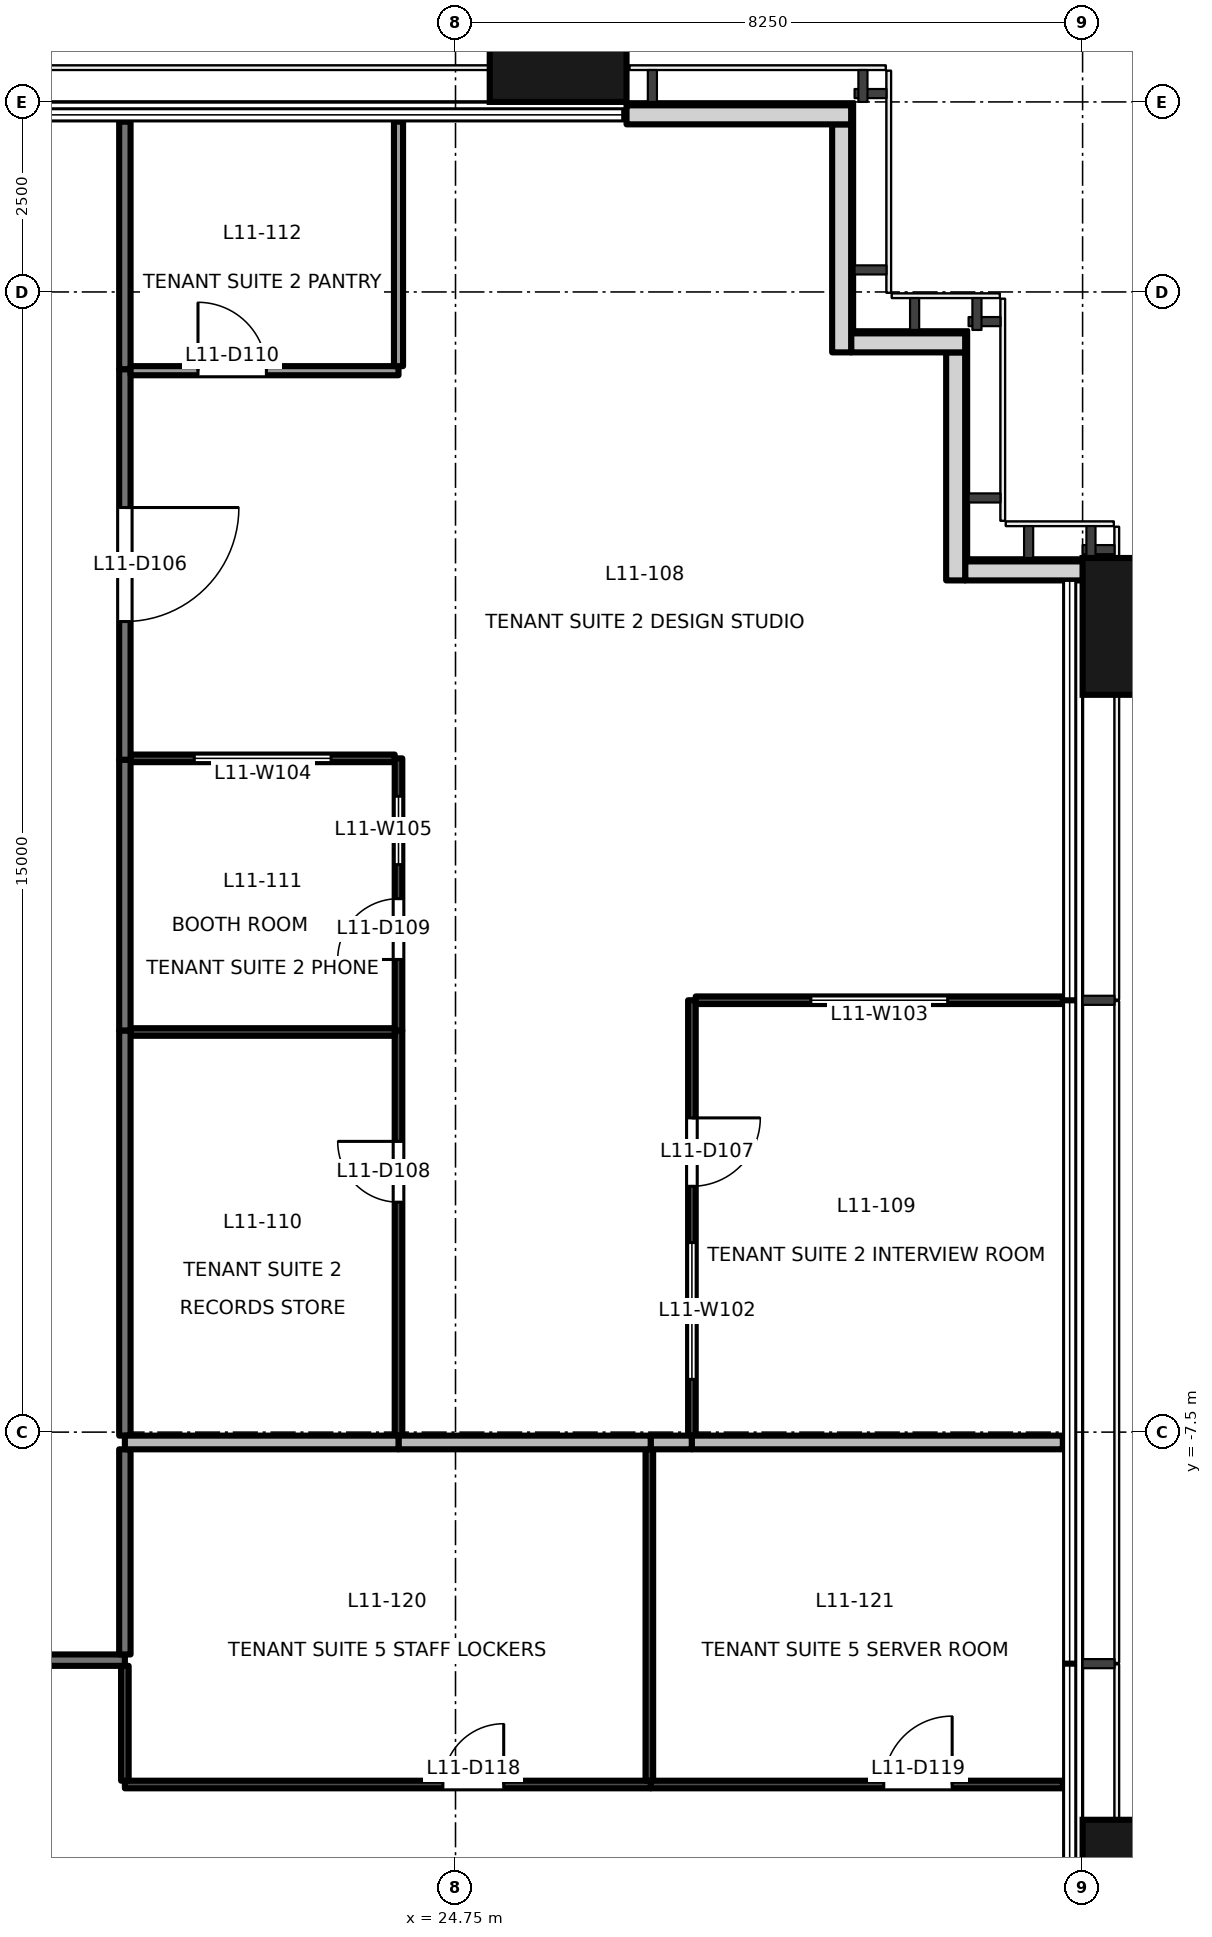
"""IFC4 building model, lengths in metres.
Left out: names, types, materials, properties, quantities, classifications, styles, units other than length and angle.
Written with IfcOpenShell. Run it as: python <this file> out.ifc"""

import sys

from ifc_helpers import new_model, si_unit, direction, frame, frame_2d, origin, origin_2d, place, context, subcontext, project, spatial, rectangle, extrude, element, fill, save


model = new_model("IFC4")
c1 = context("Model", 3, precision=1e-05, world=origin(), true_north=direction((0.0, 1.0)))
c2 = subcontext(c1, "Body", "Model", "MODEL_VIEW")
j1 = project(units=[si_unit("LENGTHUNIT", "METRE"), si_unit("PLANEANGLEUNIT", "RADIAN")], contexts=[c1])
p1 = place(None, origin())
s1 = spatial("IfcSite", under=j1, at=p1, CompositionType="ELEMENT")
p2 = place(p1, origin())
s2 = spatial("IfcBuilding", under=s1, at=p2, CompositionType="ELEMENT")
p3 = place(p2, frame((0.0, 0.0, 52.9)))
s3 = spatial("IfcBuildingStorey", under=s2, at=p3, CompositionType="ELEMENT", Elevation=52.9)
for number, where, z_axis, x_axis in (
    (1, (33.9, -13.5, -0.2), (0.0, 0.0, 1.0), (0.0, 1.0, 0.0)),
    (2, (33.9, 3.1, -0.2), (0.0, 0.0, 1.0), (0.0, 1.0, 0.0)),
    (3, (26.1, 10.9, -0.2), (0.0, 0.0, 1.0), (1.0, 0.0, 0.0)),
):
    element("IfcColumn", number, at=place(p3, frame(where, z_axis=z_axis, x_axis=x_axis)), inside=s3, PredefinedType="COLUMN", context=c2, shape_type="SweptSolid", body=[
        extrude(rectangle(XDim=1.8, YDim=1.8, at=origin_2d()), origin(), (0.0, 0.0, 1.0), 4.1),
    ])
p4 = place(p3, frame((33.005, 3.83, 0.0), z_axis=(0.0, 0.0, 1.0), x_axis=(-1.0, 0.0, 0.0)))
e4 = element("IfcWall", 4, at=p4, inside=s3, PredefinedType="SOLIDWALL", context=c2, shape_type="SweptSolid", body=[
    extrude(rectangle(XDim=1.55, YDim=0.25, at=frame_2d((0.775, 0.0))), origin(), (0.0, 0.0, 1.0), 3.9),
])
p5 = place(p3, frame((31.33, 3.705, 0.0), z_axis=(0.0, 0.0, 1.0), x_axis=(0.0, 1.0, 0.0)))
e5 = element("IfcWall", 5, at=p5, inside=s3, PredefinedType="SOLIDWALL", context=c2, shape_type="SweptSolid", body=[
    extrude(rectangle(XDim=3.0, YDim=0.25, at=frame_2d((1.5, 0.0))), origin(), (0.0, 0.0, 1.0), 3.9),
])
p6 = place(p3, frame((31.455, 6.83, 0.0), z_axis=(0.0, 0.0, 1.0), x_axis=(-1.0, 0.0, 0.0)))
e6 = element("IfcWall", 6, at=p6, inside=s3, PredefinedType="SOLIDWALL", context=c2, shape_type="SweptSolid", body=[
    extrude(rectangle(XDim=1.5, YDim=0.25, at=frame_2d((0.75, 0.0))), origin(), (0.0, 0.0, 1.0), 3.9),
])
p7 = place(p3, frame((29.83, 6.705, 0.0), z_axis=(0.0, 0.0, 1.0), x_axis=(0.0, 1.0, 0.0)))
e7 = element("IfcWall", 7, at=p7, inside=s3, PredefinedType="SOLIDWALL", context=c2, shape_type="SweptSolid", body=[
    extrude(rectangle(XDim=3.0, YDim=0.25, at=frame_2d((1.5, 0.0))), origin(), (0.0, 0.0, 1.0), 3.9),
])
p8 = place(p3, frame((29.955, 9.83, 0.0), z_axis=(0.0, 0.0, 1.0), x_axis=(-1.0, 0.0, 0.0)))
e8 = element("IfcWall", 8, at=p8, inside=s3, PredefinedType="SOLIDWALL", context=c2, shape_type="SweptSolid", body=[
    extrude(rectangle(XDim=2.955, YDim=0.25, at=frame_2d((1.478, 0.0))), origin(), (0.0, 0.0, 1.0), 3.9),
])
p9 = place(p3, frame((20.4, 6.484, 0.0), z_axis=(0.0, 0.0, 1.0), x_axis=(0.0, -1.0, 0.0)))
e9 = element("IfcWall", 9, at=p9, inside=s3, PredefinedType="PARTITIONING", context=c2, shape_type="SweptSolid", body=[
    extrude(rectangle(XDim=5.14, YDim=0.15, at=frame_2d((2.57, 0.0))), origin(), (0.0, 0.0, 1.0), 3.9),
])
p10 = place(p9, frame((1.82, 0.0, 0.0)))
e10 = element("IfcOpeningElement", 10, at=p10, cuts=e9, PredefinedType="OPENING", context=c2, shape_type="SweptSolid", body=[
    extrude(rectangle(XDim=1.5, YDim=2.1, at=frame_2d((0.75, 1.05))), frame((0.0, 0.085, 0.0), z_axis=(0.0, -1.0, 0.0), x_axis=(1.0, 0.0, 0.0)), (0.0, 0.0, 1.0), 0.171),
])
p11 = place(p3, frame((20.4, -2.216, 0.0), z_axis=(0.0, 0.0, 1.0), x_axis=(0.0, -1.0, 0.0)))
e11 = element("IfcWall", 11, at=p11, inside=s3, PredefinedType="PARTITIONING", context=c2, shape_type="SweptSolid", body=[
    extrude(rectangle(XDim=5.33, YDim=0.15, at=frame_2d((2.665, 0.0))), origin(), (0.0, 0.0, 1.0), 3.3),
])
p12 = place(p3, frame((20.4, 1.344, 0.0), z_axis=(0.0, 0.0, 1.0), x_axis=(0.0, -1.0, 0.0)))
e12 = element("IfcWall", 12, at=p12, inside=s3, PredefinedType="PARTITIONING", context=c2, shape_type="SweptSolid", body=[
    extrude(rectangle(XDim=3.56, YDim=0.15, at=frame_2d((1.78, 0.0))), origin(), (0.0, 0.0, 1.0), 3.3),
])
p13 = place(p3, frame((20.4, 9.74, 0.0), z_axis=(0.0, 0.0, 1.0), x_axis=(0.0, -1.0, 0.0)))
e13 = element("IfcWall", 13, at=p13, inside=s3, PredefinedType="PARTITIONING", context=c2, shape_type="SweptSolid", body=[
    extrude(rectangle(XDim=3.256, YDim=0.15, at=frame_2d((1.628, 0.0))), origin(), (0.0, 0.0, 1.0), 3.9),
])
p14 = place(p3, frame((20.4, -10.5, 0.0), z_axis=(0.0, 0.0, 1.0), x_axis=(-1.0, 0.0, 0.0)))
e14 = element("IfcWall", 14, at=p14, inside=s3, PredefinedType="PARTITIONING", context=c2, shape_type="SweptSolid", body=[
    extrude(rectangle(XDim=14.31, YDim=0.15, at=frame_2d((7.155, 0.0))), origin(), (0.0, 0.0, 1.0), 2.5),
])
p15 = place(p14, frame((3.252, 0.0, 0.0)))
e15 = element("IfcOpeningElement", 15, at=p15, cuts=e14, PredefinedType="OPENING", context=c2, shape_type="SweptSolid", body=[
    extrude(rectangle(XDim=1.8, YDim=2.1, at=frame_2d((0.9, 1.05))), frame((0.0, 0.085, 0.0), z_axis=(0.0, -1.0, 0.0), x_axis=(1.0, 0.0, 0.0)), (0.0, 0.0, 1.0), 0.171),
])
p16 = place(p3, frame((20.4, -7.726, 0.0), z_axis=(0.0, 0.0, 1.0), x_axis=(0.0, -1.0, 0.0)))
e16 = element("IfcWall", 16, at=p16, inside=s3, PredefinedType="PARTITIONING", context=c2, shape_type="SweptSolid", body=[
    extrude(rectangle(XDim=2.699, YDim=0.15, at=frame_2d((1.35, 0.0))), origin(), (0.0, 0.0, 1.0), 3.3),
])
p17 = place(p3, frame((27.86, -1.818, 0.0), z_axis=(0.0, 0.0, 1.0), x_axis=(0.0, -1.0, 0.0)))
e17 = element("IfcWall", 17, at=p17, inside=s3, PredefinedType="PARTITIONING", context=c2, shape_type="SweptSolid", body=[
    extrude(rectangle(XDim=5.728, YDim=0.1, at=frame_2d((2.864, 0.0))), origin(), (0.0, 0.0, 1.0), 3.3),
])
p18 = place(p17, frame((1.548, 0.0, 0.0)))
e18 = element("IfcOpeningElement", 18, at=p18, cuts=e17, PredefinedType="OPENING", context=c2, shape_type="SweptSolid", body=[
    extrude(rectangle(XDim=0.9, YDim=2.1, at=frame_2d((0.45, 1.05))), frame((0.0, 0.061, 0.0), z_axis=(0.0, -1.0, 0.0), x_axis=(1.0, 0.0, 0.0)), (0.0, 0.0, 1.0), 0.121),
])
p19 = place(p17, frame((3.188, 0.0, 0.9)))
e19 = element("IfcOpeningElement", 19, at=p19, cuts=e17, PredefinedType="OPENING", context=c2, shape_type="SweptSolid", body=[
    extrude(rectangle(XDim=1.8, YDim=1.2, at=frame_2d((0.9, 0.6))), frame((0.0, 0.061, 0.0), z_axis=(0.0, -1.0, 0.0), x_axis=(1.0, 0.0, 0.0)), (0.0, 0.0, 1.0), 0.121),
])
p20 = place(p3, frame((32.74, -1.818, 0.0), z_axis=(0.0, 0.0, 1.0), x_axis=(-1.0, 0.0, 0.0)))
e20 = element("IfcWall", 20, at=p20, inside=s3, PredefinedType="PARTITIONING", context=c2, shape_type="SweptSolid", body=[
    extrude(rectangle(XDim=4.83, YDim=0.1, at=frame_2d((2.415, 0.0))), origin(), (0.0, 0.0, 1.0), 3.9),
])
p21 = place(p20, frame((1.515, 0.0, 0.9)))
e21 = element("IfcOpeningElement", 21, at=p21, cuts=e20, PredefinedType="OPENING", context=c2, shape_type="SweptSolid", body=[
    extrude(rectangle(XDim=1.8, YDim=1.2, at=frame_2d((0.9, 0.6))), frame((0.0, 0.061, 0.0), z_axis=(0.0, -1.0, 0.0), x_axis=(1.0, 0.0, 0.0)), (0.0, 0.0, 1.0), 0.121),
])
p22 = place(p3, frame((24.0, -7.546, 0.0), z_axis=(0.0, 0.0, 1.0), x_axis=(0.0, 1.0, 0.0)))
e22 = element("IfcWall", 22, at=p22, inside=s3, PredefinedType="PARTITIONING", context=c2, shape_type="SweptSolid", body=[
    extrude(rectangle(XDim=5.33, YDim=0.1, at=frame_2d((2.665, 0.0))), origin(), (0.0, 0.0, 1.0), 3.3),
])
p23 = place(p22, frame((3.071, 0.0, 0.0)))
e23 = element("IfcOpeningElement", 23, at=p23, cuts=e22, PredefinedType="OPENING", context=c2, shape_type="SweptSolid", body=[
    extrude(rectangle(XDim=0.8, YDim=2.1, at=frame_2d((0.4, 1.05))), frame((0.0, 0.061, 0.0), z_axis=(0.0, -1.0, 0.0), x_axis=(1.0, 0.0, 0.0)), (0.0, 0.0, 1.0), 0.121),
])
p24 = place(p3, frame((23.95, 1.364, 0.0), z_axis=(0.0, 0.0, 1.0), x_axis=(-1.0, 0.0, 0.0)))
e24 = element("IfcWall", 24, at=p24, inside=s3, PredefinedType="PARTITIONING", context=c2, shape_type="SweptSolid", body=[
    extrude(rectangle(XDim=3.475, YDim=0.1, at=frame_2d((1.737, 0.0))), origin(), (0.0, 0.0, 1.0), 3.9),
])
p25 = place(p24, frame((0.837, 0.0, 0.9)))
e25 = element("IfcOpeningElement", 25, at=p25, cuts=e24, PredefinedType="OPENING", context=c2, shape_type="SweptSolid", body=[
    extrude(rectangle(XDim=1.8, YDim=1.2, at=frame_2d((0.9, 0.6))), frame((0.0, 0.061, 0.0), z_axis=(0.0, -1.0, 0.0), x_axis=(1.0, 0.0, 0.0)), (0.0, 0.0, 1.0), 0.121),
])
p26 = place(p3, frame((24.0, -2.216, 0.0), z_axis=(0.0, 0.0, 1.0), x_axis=(0.0, 1.0, 0.0)))
e26 = element("IfcWall", 26, at=p26, inside=s3, PredefinedType="PARTITIONING", context=c2, shape_type="SweptSolid", body=[
    extrude(rectangle(XDim=3.58, YDim=0.1, at=frame_2d((1.79, 0.0))), origin(), (0.0, 0.0, 1.0), 3.3),
])
p27 = place(p26, frame((0.934, 0.0, 0.0)))
e27 = element("IfcOpeningElement", 27, at=p27, cuts=e26, PredefinedType="OPENING", context=c2, shape_type="SweptSolid", body=[
    extrude(rectangle(XDim=0.8, YDim=2.1, at=frame_2d((0.4, 1.05))), frame((0.0, 0.061, 0.0), z_axis=(0.0, -1.0, 0.0), x_axis=(1.0, 0.0, 0.0)), (0.0, 0.0, 1.0), 0.121),
])
p28 = place(p26, frame((2.182, 0.0, 0.9)))
e28 = element("IfcOpeningElement", 28, at=p28, cuts=e26, PredefinedType="OPENING", context=c2, shape_type="SweptSolid", body=[
    extrude(rectangle(XDim=0.9, YDim=1.2, at=frame_2d((0.45, 0.6))), frame((0.0, 0.061, 0.0), z_axis=(0.0, -1.0, 0.0), x_axis=(1.0, 0.0, 0.0)), (0.0, 0.0, 1.0), 0.121),
])
p29 = place(p3, frame((20.475, 6.464, 0.0), z_axis=(0.0, 0.0, 1.0), x_axis=(1.0, 0.0, 0.0)))
e29 = element("IfcWall", 29, at=p29, inside=s3, PredefinedType="PARTITIONING", context=c2, shape_type="SweptSolid", body=[
    extrude(rectangle(XDim=3.525, YDim=0.12, at=frame_2d((1.762, 0.0))), origin(), (0.0, 0.0, 1.0), 3.9),
])
p30 = place(p29, frame((0.887, 0.0, 0.0)))
e30 = element("IfcOpeningElement", 30, at=p30, cuts=e29, PredefinedType="OPENING", context=c2, shape_type="SweptSolid", body=[
    extrude(rectangle(XDim=0.9, YDim=2.1, at=frame_2d((0.45, 1.05))), frame((0.0, 0.071, 0.0), z_axis=(0.0, -1.0, 0.0), x_axis=(1.0, 0.0, 0.0)), (0.0, 0.0, 1.0), 0.141),
])
p31 = place(p3, frame((24.0, 6.524, 0.0), z_axis=(0.0, 0.0, 1.0), x_axis=(0.0, 1.0, 0.0)))
e31 = element("IfcWall", 31, at=p31, inside=s3, PredefinedType="PARTITIONING", context=c2, shape_type="SweptSolid", body=[
    extrude(rectangle(XDim=3.216, YDim=0.12, at=frame_2d((1.608, 0.0))), origin(), (0.0, 0.0, 1.0), 3.9),
])
p32 = place(p3, frame((27.32, -7.636, 0.0), z_axis=(0.0, 0.0, 1.0), x_axis=(-1.0, 0.0, 0.0)))
e32 = element("IfcWall", 32, at=p32, inside=s3, PredefinedType="PARTITIONING", context=c2, shape_type="SweptSolid", body=[
    extrude(rectangle(XDim=3.32, YDim=0.18, at=frame_2d((1.66, 0.0))), origin(), (0.0, 0.0, 1.0), 3.9),
])
p33 = place(p3, frame((27.86, -7.636, 0.0), z_axis=(0.0, 0.0, 1.0), x_axis=(-1.0, 0.0, 0.0)))
e33 = element("IfcWall", 33, at=p33, inside=s3, PredefinedType="PARTITIONING", context=c2, shape_type="SweptSolid", body=[
    extrude(rectangle(XDim=0.54, YDim=0.18, at=frame_2d((0.27, 0.0))), origin(), (0.0, 0.0, 1.0), 3.9),
])
p34 = place(p3, frame((32.74, -7.636, 0.0), z_axis=(0.0, 0.0, 1.0), x_axis=(-1.0, 0.0, 0.0)))
e34 = element("IfcWall", 34, at=p34, inside=s3, PredefinedType="PARTITIONING", context=c2, shape_type="SweptSolid", body=[
    extrude(rectangle(XDim=4.88, YDim=0.18, at=frame_2d((2.44, 0.0))), origin(), (0.0, 0.0, 1.0), 3.9),
])
p35 = place(p3, frame((20.475, -2.236, 0.0), z_axis=(0.0, 0.0, 1.0), x_axis=(1.0, 0.0, 0.0)))
e35 = element("IfcWall", 35, at=p35, inside=s3, PredefinedType="PARTITIONING", context=c2, shape_type="SweptSolid", body=[
    extrude(rectangle(XDim=3.475, YDim=0.1, at=frame_2d((1.737, 0.0))), origin(), (0.0, 0.0, 1.0), 3.9),
])
p36 = place(p3, frame((24.0, -7.636, 0.0), z_axis=(0.0, 0.0, 1.0), x_axis=(-1.0, 0.0, 0.0)))
e36 = element("IfcWall", 36, at=p36, inside=s3, PredefinedType="PARTITIONING", context=c2, shape_type="SweptSolid", body=[
    extrude(rectangle(XDim=3.6, YDim=0.18, at=frame_2d((1.8, 0.0))), origin(), (0.0, 0.0, 1.0), 3.9),
])
p37 = place(p3, frame((20.4, -12.136, 0.0), z_axis=(0.0, 0.0, 1.0), x_axis=(1.0, 0.0, 0.0)))
e37 = element("IfcWall", 37, at=p37, inside=s3, PredefinedType="PARTITIONING", context=c2, shape_type="SweptSolid", body=[
    extrude(rectangle(XDim=6.92, YDim=0.1, at=frame_2d((3.46, 0.0))), origin(), (0.0, 0.0, 1.0), 3.9),
])
p38 = place(p37, frame((4.184, 0.0, 0.0)))
e38 = element("IfcOpeningElement", 38, at=p38, cuts=e37, PredefinedType="OPENING", context=c2, shape_type="SweptSolid", body=[
    extrude(rectangle(XDim=0.8, YDim=2.1, at=frame_2d((0.4, 1.05))), frame((0.0, 0.061, 0.0), z_axis=(0.0, -1.0, 0.0), x_axis=(1.0, 0.0, 0.0)), (0.0, 0.0, 1.0), 0.121),
])
p39 = place(p3, frame((20.4, -10.575, 0.0), z_axis=(0.0, 0.0, 1.0), x_axis=(0.0, -1.0, 0.0)))
e39 = element("IfcWall", 39, at=p39, inside=s3, PredefinedType="PARTITIONING", context=c2, shape_type="SweptSolid", body=[
    extrude(rectangle(XDim=1.511, YDim=0.1, at=frame_2d((0.755, 0.0))), origin(), (0.0, 0.0, 1.0), 3.9),
])
p40 = place(p3, frame((27.32, -12.136, 0.0), z_axis=(0.0, 0.0, 1.0), x_axis=(1.0, 0.0, 0.0)))
e40 = element("IfcWall", 40, at=p40, inside=s3, PredefinedType="PARTITIONING", context=c2, shape_type="SweptSolid", body=[
    extrude(rectangle(XDim=5.42, YDim=0.1, at=frame_2d((2.71, 0.0))), origin(), (0.0, 0.0, 1.0), 3.9),
])
p41 = place(p40, frame((3.064, 0.0, 0.0)))
e41 = element("IfcOpeningElement", 41, at=p41, cuts=e40, PredefinedType="OPENING", context=c2, shape_type="SweptSolid", body=[
    extrude(rectangle(XDim=0.9, YDim=2.1, at=frame_2d((0.45, 1.05))), frame((0.0, 0.061, 0.0), z_axis=(0.0, -1.0, 0.0), x_axis=(1.0, 0.0, 0.0)), (0.0, 0.0, 1.0), 0.121),
])
p42 = place(p3, frame((27.3, -7.726, 0.0), z_axis=(0.0, 0.0, 1.0), x_axis=(0.0, -1.0, 0.0)))
e42 = element("IfcWall", 42, at=p42, inside=s3, PredefinedType="PARTITIONING", context=c2, shape_type="SweptSolid", body=[
    extrude(rectangle(XDim=4.36, YDim=0.1, at=frame_2d((2.18, 0.0))), origin(), (0.0, 0.0, 1.0), 3.3),
])
p43 = place(p10, origin())
e43 = element("IfcDoor", 43, at=p43, inside=s3, OperationType="DOUBLE_DOOR_SINGLE_SWING", PredefinedType="DOOR", context=c2, shape_type="SweptSolid", body=[
    extrude(rectangle(XDim=1.5, YDim=2.1, at=frame_2d((0.75, 1.05))), frame((0.0, 0.025, 0.0), z_axis=(0.0, -1.0, 0.0), x_axis=(1.0, 0.0, 0.0)), (0.0, 0.0, 1.0), 0.05),
])
fill(e10, e43)
p44 = place(p18, origin())
e44 = element("IfcDoor", 44, at=p44, inside=s3, OperationType="SINGLE_SWING_LEFT", PredefinedType="DOOR", context=c2, shape_type="SweptSolid", body=[
    extrude(rectangle(XDim=0.9, YDim=2.1, at=frame_2d((0.45, 1.05))), frame((0.0, 0.025, 0.0), z_axis=(0.0, -1.0, 0.0), x_axis=(1.0, 0.0, 0.0)), (0.0, 0.0, 1.0), 0.05),
])
fill(e18, e44)
p45 = place(p23, origin())
e45 = element("IfcDoor", 45, at=p45, inside=s3, OperationType="SINGLE_SWING_RIGHT", PredefinedType="DOOR", context=c2, shape_type="SweptSolid", body=[
    extrude(rectangle(XDim=0.8, YDim=2.1, at=frame_2d((0.4, 1.05))), frame((0.0, 0.025, 0.0), z_axis=(0.0, -1.0, 0.0), x_axis=(1.0, 0.0, 0.0)), (0.0, 0.0, 1.0), 0.05),
])
fill(e23, e45)
p46 = place(p27, origin())
e46 = element("IfcDoor", 46, at=p46, inside=s3, OperationType="SINGLE_SWING_LEFT", PredefinedType="DOOR", context=c2, shape_type="SweptSolid", body=[
    extrude(rectangle(XDim=0.8, YDim=2.1, at=frame_2d((0.4, 1.05))), frame((0.0, 0.025, 0.0), z_axis=(0.0, -1.0, 0.0), x_axis=(1.0, 0.0, 0.0)), (0.0, 0.0, 1.0), 0.05),
])
fill(e27, e46)
p47 = place(p30, origin())
e47 = element("IfcDoor", 47, at=p47, inside=s3, OperationType="SINGLE_SWING_LEFT", PredefinedType="DOOR", context=c2, shape_type="SweptSolid", body=[
    extrude(rectangle(XDim=0.9, YDim=2.1, at=frame_2d((0.45, 1.05))), frame((0.0, 0.025, 0.0), z_axis=(0.0, -1.0, 0.0), x_axis=(1.0, 0.0, 0.0)), (0.0, 0.0, 1.0), 0.05),
])
fill(e30, e47)
p48 = place(p38, origin())
e48 = element("IfcDoor", 48, at=p48, inside=s3, OperationType="SINGLE_SWING_RIGHT", PredefinedType="DOOR", context=c2, shape_type="SweptSolid", body=[
    extrude(rectangle(XDim=0.8, YDim=2.1, at=frame_2d((0.4, 1.05))), frame((0.0, 0.025, 0.0), z_axis=(0.0, -1.0, 0.0), x_axis=(1.0, 0.0, 0.0)), (0.0, 0.0, 1.0), 0.05),
])
fill(e38, e48)
p49 = place(p41, origin())
e49 = element("IfcDoor", 49, at=p49, inside=s3, OperationType="SINGLE_SWING_RIGHT", PredefinedType="DOOR", context=c2, shape_type="SweptSolid", body=[
    extrude(rectangle(XDim=0.9, YDim=2.1, at=frame_2d((0.45, 1.05))), frame((0.0, 0.025, 0.0), z_axis=(0.0, -1.0, 0.0), x_axis=(1.0, 0.0, 0.0)), (0.0, 0.0, 1.0), 0.05),
])
fill(e41, e49)
p50 = place(p19, origin())
e50 = element("IfcWindow", 50, at=p50, inside=s3, PartitioningType="SINGLE_PANEL", PredefinedType="WINDOW", context=c2, shape_type="SweptSolid", body=[
    extrude(rectangle(XDim=1.8, YDim=1.2, at=frame_2d((0.9, 0.6))), frame((0.0, 0.03, 0.0), z_axis=(0.0, -1.0, 0.0), x_axis=(1.0, 0.0, 0.0)), (0.0, 0.0, 1.0), 0.06),
])
fill(e19, e50)
p51 = place(p21, origin())
e51 = element("IfcWindow", 51, at=p51, inside=s3, PartitioningType="SINGLE_PANEL", PredefinedType="WINDOW", context=c2, shape_type="SweptSolid", body=[
    extrude(rectangle(XDim=1.8, YDim=1.2, at=frame_2d((0.9, 0.6))), frame((0.0, 0.03, 0.0), z_axis=(0.0, -1.0, 0.0), x_axis=(1.0, 0.0, 0.0)), (0.0, 0.0, 1.0), 0.06),
])
fill(e21, e51)
p52 = place(p25, origin())
e52 = element("IfcWindow", 52, at=p52, inside=s3, PartitioningType="SINGLE_PANEL", PredefinedType="WINDOW", context=c2, shape_type="SweptSolid", body=[
    extrude(rectangle(XDim=1.8, YDim=1.2, at=frame_2d((0.9, 0.6))), frame((0.0, 0.03, 0.0), z_axis=(0.0, -1.0, 0.0), x_axis=(1.0, 0.0, 0.0)), (0.0, 0.0, 1.0), 0.06),
])
fill(e25, e52)
p53 = place(p28, origin())
e53 = element("IfcWindow", 53, at=p53, inside=s3, PartitioningType="SINGLE_PANEL", PredefinedType="WINDOW", context=c2, shape_type="SweptSolid", body=[
    extrude(rectangle(XDim=0.9, YDim=1.2, at=frame_2d((0.45, 0.6))), frame((0.0, 0.03, 0.0), z_axis=(0.0, -1.0, 0.0), x_axis=(1.0, 0.0, 0.0)), (0.0, 0.0, 1.0), 0.06),
])
fill(e28, e53)
save(model, sys.argv[1])
